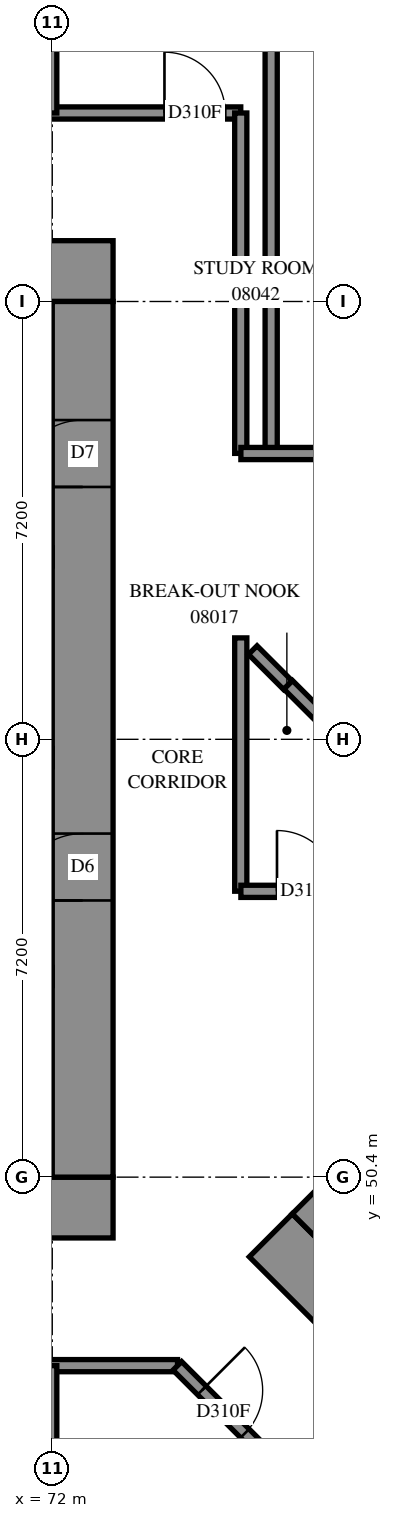
"""IFC4 building model, lengths in metres.
Left out: names, types, materials, properties, quantities, classifications, styles, units other than length and angle.
Written with IfcOpenShell. Run it as: python <this file> out.ifc"""

import sys

from ifc_helpers import new_model, si_unit, direction, frame, frame_2d, origin, place, context, subcontext, project, spatial, rectangle, extrude, element, fill, save


model = new_model("IFC4")
c1 = context("Model", 3, precision=1e-05, world=origin(), true_north=direction((0.0, 1.0)))
c2 = subcontext(c1, "Body", "Model", "MODEL_VIEW")
j1 = project(units=[si_unit("LENGTHUNIT", "METRE"), si_unit("PLANEANGLEUNIT", "RADIAN")], contexts=[c1])
p1 = place(None, origin())
s1 = spatial("IfcSite", under=j1, at=p1, CompositionType="ELEMENT")
p2 = place(p1, origin())
s2 = spatial("IfcBuilding", under=s1, at=p2, CompositionType="ELEMENT")
p3 = place(p2, frame((0.0, 0.0, 33.8)))
s3 = spatial("IfcBuildingStorey", under=s2, at=p3, CompositionType="ELEMENT", Elevation=33.8)
p4 = place(p3, frame((56.6, 49.9, -0.3), z_axis=(0.0, 0.0, 1.0), x_axis=(1.0, 0.0, 0.0)))
e1 = element("IfcWall", 1, at=p4, inside=s3, PredefinedType="SHEAR", context=c2, shape_type="SweptSolid", body=[
    extrude(rectangle(XDim=16.4, YDim=1.0, at=frame_2d((8.2, 0.0))), origin(), (0.0, 0.0, 1.0), 2.7),
])
p5 = place(p3, frame((56.6, 65.3, -0.3), z_axis=(0.0, 0.0, 1.0), x_axis=(1.0, 0.0, 0.0)))
e2 = element("IfcWall", 2, at=p5, inside=s3, PredefinedType="SHEAR", context=c2, shape_type="SweptSolid", body=[
    extrude(rectangle(XDim=16.4, YDim=1.0, at=frame_2d((8.2, 0.0))), origin(), (0.0, 0.0, 1.0), 2.7),
])
p6 = place(p5, frame((11.0, 0.0, 0.3)))
e3 = element("IfcOpeningElement", 3, at=p6, cuts=e2, PredefinedType="OPENING", context=c2, shape_type="SweptSolid", body=[
    extrude(rectangle(XDim=0.8, YDim=2.1, at=frame_2d((0.4, 1.05))), frame((0.0, 0.51, 0.0), z_axis=(0.0, -1.0, 0.0), x_axis=(1.0, 0.0, 0.0)), (0.0, 0.0, 1.0), 1.02),
])
p7 = place(p3, frame((72.5, 50.4, -0.3), z_axis=(0.0, 0.0, 1.0), x_axis=(0.0, 1.0, 0.0)))
e4 = element("IfcWall", 4, at=p7, inside=s3, PredefinedType="SHEAR", context=c2, shape_type="SweptSolid", body=[
    extrude(rectangle(XDim=14.4, YDim=1.0, at=frame_2d((7.2, 0.0))), origin(), (0.0, 0.0, 1.0), 2.7),
])
p8 = place(p7, frame((4.55, 0.0, 0.3)))
e5 = element("IfcOpeningElement", 5, at=p8, cuts=e4, PredefinedType="OPENING", context=c2, shape_type="SweptSolid", body=[
    extrude(rectangle(XDim=1.1, YDim=2.1, at=frame_2d((0.55, 1.05))), frame((0.0, 0.51, 0.0), z_axis=(0.0, -1.0, 0.0), x_axis=(1.0, 0.0, 0.0)), (0.0, 0.0, 1.0), 1.02),
])
p9 = place(p7, frame((11.35, 0.0, 0.3)))
e6 = element("IfcOpeningElement", 6, at=p9, cuts=e4, PredefinedType="OPENING", context=c2, shape_type="SweptSolid", body=[
    extrude(rectangle(XDim=1.1, YDim=2.1, at=frame_2d((0.55, 1.05))), frame((0.0, 0.51, 0.0), z_axis=(0.0, -1.0, 0.0), x_axis=(1.0, 0.0, 0.0)), (0.0, 0.0, 1.0), 1.02),
])
p10 = place(p3, frame((75.594, 49.443, -0.3), z_axis=(0.0, 0.0, 1.0), x_axis=(0.7071037324, -0.70710983, 0.0)))
e7 = element("IfcWall", 7, at=p10, inside=s3, PredefinedType="SHEAR", context=c2, shape_type="SweptSolid", body=[
    extrude(rectangle(XDim=16.4, YDim=1.0, at=frame_2d((8.2, 0.0))), origin(), (0.0, 0.0, 1.0), 2.7),
])
p11 = place(p3, frame((76.301, 49.443, -0.3), z_axis=(0.0, 0.0, 1.0), x_axis=(0.7071067812, 0.7071067812, 0.0)))
e8 = element("IfcWall", 8, at=p11, inside=s3, PredefinedType="SHEAR", context=c2, shape_type="SweptSolid", body=[
    extrude(rectangle(XDim=14.4, YDim=1.0, at=frame_2d((7.2, 0.0))), origin(), (0.0, 0.0, 1.0), 2.7),
])
p12 = place(p11, frame((4.55, 0.0, 0.3)))
e9 = element("IfcOpeningElement", 9, at=p12, cuts=e8, PredefinedType="OPENING", context=c2, shape_type="SweptSolid", body=[
    extrude(rectangle(XDim=1.1, YDim=2.1, at=frame_2d((0.55, 1.05))), frame((0.0, 0.51, 0.0), z_axis=(0.0, -1.0, 0.0), x_axis=(1.0, 0.0, 0.0)), (0.0, 0.0, 1.0), 1.02),
])
p13 = place(p11, frame((11.35, 0.0, 0.3)))
e10 = element("IfcOpeningElement", 10, at=p13, cuts=e8, PredefinedType="OPENING", context=c2, shape_type="SweptSolid", body=[
    extrude(rectangle(XDim=1.1, YDim=2.1, at=frame_2d((0.55, 1.05))), frame((0.0, 0.51, 0.0), z_axis=(0.0, -1.0, 0.0), x_axis=(1.0, 0.0, 0.0)), (0.0, 0.0, 1.0), 1.02),
])
p14 = place(p3, frame((54.5, 67.9, 0.0), z_axis=(0.0, 0.0, 1.0), x_axis=(1.0, 0.0, 0.0)))
e11 = element("IfcWall", 11, at=p14, inside=s3, PredefinedType="PARTITIONING", context=c2, shape_type="SweptSolid", body=[
    extrude(rectangle(XDim=20.6, YDim=0.2, at=frame_2d((10.3, 0.0))), origin(), (0.0, 0.0, 1.0), 3.1),
])
p15 = place(p14, frame((0.255, 0.0, 0.0)))
e12 = element("IfcOpeningElement", 12, at=p15, cuts=e11, PredefinedType="OPENING", context=c2, shape_type="SweptSolid", body=[
    extrude(rectangle(XDim=1.0, YDim=2.1, at=frame_2d((0.5, 1.05))), frame((0.0, 0.11, 0.0), z_axis=(0.0, -1.0, 0.0), x_axis=(1.0, 0.0, 0.0)), (0.0, 0.0, 1.0), 0.22),
])
p16 = place(p14, frame((19.345, 0.0, 0.0)))
e13 = element("IfcOpeningElement", 13, at=p16, cuts=e11, PredefinedType="OPENING", context=c2, shape_type="SweptSolid", body=[
    extrude(rectangle(XDim=1.0, YDim=2.1, at=frame_2d((0.5, 1.05))), frame((0.0, 0.11, 0.0), z_axis=(0.0, -1.0, 0.0), x_axis=(1.0, 0.0, 0.0)), (0.0, 0.0, 1.0), 0.22),
])
p17 = place(p14, frame((5.45, 0.0, 0.0)))
e14 = element("IfcOpeningElement", 14, at=p17, cuts=e11, PredefinedType="OPENING", context=c2, shape_type="SweptSolid", body=[
    extrude(rectangle(XDim=0.9, YDim=2.1, at=frame_2d((0.45, 1.05))), frame((0.0, 0.11, 0.0), z_axis=(0.0, -1.0, 0.0), x_axis=(1.0, 0.0, 0.0)), (0.0, 0.0, 1.0), 0.22),
])
p18 = place(p14, frame((7.1, 0.0, 0.0)))
e15 = element("IfcOpeningElement", 15, at=p18, cuts=e11, PredefinedType="OPENING", context=c2, shape_type="SweptSolid", body=[
    extrude(rectangle(XDim=0.9, YDim=2.1, at=frame_2d((0.45, 1.05))), frame((0.0, 0.11, 0.0), z_axis=(0.0, -1.0, 0.0), x_axis=(1.0, 0.0, 0.0)), (0.0, 0.0, 1.0), 0.22),
])
p19 = place(p14, frame((12.65, 0.0, 0.0)))
e16 = element("IfcOpeningElement", 16, at=p19, cuts=e11, PredefinedType="OPENING", context=c2, shape_type="SweptSolid", body=[
    extrude(rectangle(XDim=0.9, YDim=2.1, at=frame_2d((0.45, 1.05))), frame((0.0, 0.11, 0.0), z_axis=(0.0, -1.0, 0.0), x_axis=(1.0, 0.0, 0.0)), (0.0, 0.0, 1.0), 0.22),
])
p20 = place(p14, frame((14.3, 0.0, 0.0)))
e17 = element("IfcOpeningElement", 17, at=p20, cuts=e11, PredefinedType="OPENING", context=c2, shape_type="SweptSolid", body=[
    extrude(rectangle(XDim=0.9, YDim=2.1, at=frame_2d((0.45, 1.05))), frame((0.0, 0.11, 0.0), z_axis=(0.0, -1.0, 0.0), x_axis=(1.0, 0.0, 0.0)), (0.0, 0.0, 1.0), 0.22),
])
p21 = place(p3, frame((54.5, 47.3, 0.0), z_axis=(0.0, 0.0, 1.0), x_axis=(1.0, 0.0, 0.0)))
e18 = element("IfcWall", 18, at=p21, inside=s3, PredefinedType="PARTITIONING", context=c2, shape_type="SweptSolid", body=[
    extrude(rectangle(XDim=19.56, YDim=0.2, at=frame_2d((9.78, 0.0))), origin(), (0.0, 0.0, 1.0), 3.1),
])
p22 = place(p21, frame((0.243, 0.0, 0.0)))
e19 = element("IfcOpeningElement", 19, at=p22, cuts=e18, PredefinedType="OPENING", context=c2, shape_type="SweptSolid", body=[
    extrude(rectangle(XDim=1.0, YDim=2.1, at=frame_2d((0.5, 1.05))), frame((0.0, 0.11, 0.0), z_axis=(0.0, -1.0, 0.0), x_axis=(1.0, 0.0, 0.0)), (0.0, 0.0, 1.0), 0.22),
])
p23 = place(p21, frame((5.4, 0.0, 0.0)))
e20 = element("IfcOpeningElement", 20, at=p23, cuts=e18, PredefinedType="OPENING", context=c2, shape_type="SweptSolid", body=[
    extrude(rectangle(XDim=0.9, YDim=2.1, at=frame_2d((0.45, 1.05))), frame((0.0, 0.11, 0.0), z_axis=(0.0, -1.0, 0.0), x_axis=(1.0, 0.0, 0.0)), (0.0, 0.0, 1.0), 0.22),
])
p24 = place(p21, frame((7.1, 0.0, 0.0)))
e21 = element("IfcOpeningElement", 21, at=p24, cuts=e18, PredefinedType="OPENING", context=c2, shape_type="SweptSolid", body=[
    extrude(rectangle(XDim=0.9, YDim=2.1, at=frame_2d((0.45, 1.05))), frame((0.0, 0.11, 0.0), z_axis=(0.0, -1.0, 0.0), x_axis=(1.0, 0.0, 0.0)), (0.0, 0.0, 1.0), 0.22),
])
p25 = place(p21, frame((12.6, 0.0, 0.0)))
e22 = element("IfcOpeningElement", 22, at=p25, cuts=e18, PredefinedType="OPENING", context=c2, shape_type="SweptSolid", body=[
    extrude(rectangle(XDim=0.9, YDim=2.1, at=frame_2d((0.45, 1.05))), frame((0.0, 0.11, 0.0), z_axis=(0.0, -1.0, 0.0), x_axis=(1.0, 0.0, 0.0)), (0.0, 0.0, 1.0), 0.22),
])
p26 = place(p21, frame((14.3, 0.0, 0.0)))
e23 = element("IfcOpeningElement", 23, at=p26, cuts=e18, PredefinedType="OPENING", context=c2, shape_type="SweptSolid", body=[
    extrude(rectangle(XDim=0.9, YDim=2.1, at=frame_2d((0.45, 1.05))), frame((0.0, 0.11, 0.0), z_axis=(0.0, -1.0, 0.0), x_axis=(1.0, 0.0, 0.0)), (0.0, 0.0, 1.0), 0.22),
])
p27 = place(p3, frame((75.6, 62.3, 0.0), z_axis=(0.0, 0.0, 1.0), x_axis=(0.0, 1.0, 0.0)))
e24 = element("IfcWall", 24, at=p27, inside=s3, PredefinedType="PARTITIONING", context=c2, shape_type="SweptSolid", body=[
    extrude(rectangle(XDim=10.415, YDim=0.2, at=frame_2d((5.207, 0.0))), origin(), (0.0, 0.0, 1.0), 3.1),
])
p28 = place(p3, frame((75.1, 62.302, 0.0), z_axis=(0.0, 0.0, 1.0), x_axis=(0.0, 1.0, 0.0)))
e25 = element("IfcWall", 25, at=p28, inside=s3, PredefinedType="PARTITIONING", context=c2, shape_type="SweptSolid", body=[
    extrude(rectangle(XDim=5.598, YDim=0.2, at=frame_2d((2.799, 0.0))), origin(), (0.0, 0.0, 1.0), 3.1),
])
p29 = place(p3, frame((74.057, 47.297, 0.0), z_axis=(0.0, 0.0, 1.0), x_axis=(0.7071067812, -0.7071067812, 0.0)))
e26 = element("IfcWall", 26, at=p29, inside=s3, PredefinedType="PARTITIONING", context=c2, shape_type="SweptSolid", body=[
    extrude(rectangle(XDim=4.653, YDim=0.2, at=frame_2d((2.326, 0.0))), origin(), (0.0, 0.0, 1.0), 3.1),
])
p30 = place(p29, frame((0.57, 0.0, 0.0)))
e27 = element("IfcOpeningElement", 27, at=p30, cuts=e26, PredefinedType="OPENING", context=c2, shape_type="SweptSolid", body=[
    extrude(rectangle(XDim=1.0, YDim=2.1, at=frame_2d((0.5, 1.05))), frame((0.0, 0.11, 0.0), z_axis=(0.0, -1.0, 0.0), x_axis=(1.0, 0.0, 0.0)), (0.0, 0.0, 1.0), 0.22),
])
p31 = place(p3, frame((75.1, 55.102, 0.0), z_axis=(0.0, 0.0, 1.0), x_axis=(0.0, 1.0, 0.0)))
e28 = element("IfcWall", 28, at=p31, inside=s3, PredefinedType="PARTITIONING", context=c2, shape_type="SweptSolid", body=[
    extrude(rectangle(XDim=4.166, YDim=0.2, at=frame_2d((2.083, 0.0))), origin(), (0.0, 0.0, 1.0), 3.1),
])
p32 = place(p3, frame((75.102, 62.3, 0.0), z_axis=(0.0, 0.0, 1.0), x_axis=(1.0, 0.0, 0.0)))
e29 = element("IfcWall", 29, at=p32, inside=s3, PredefinedType="PARTITIONING", context=c2, shape_type="SweptSolid", body=[
    extrude(rectangle(XDim=4.098, YDim=0.2, at=frame_2d((2.049, 0.0))), origin(), (0.0, 0.0, 1.0), 3.1),
])
p33 = place(p3, frame((75.102, 55.1, 0.0), z_axis=(0.0, 0.0, 1.0), x_axis=(1.0, 0.0, 0.0)))
e30 = element("IfcWall", 30, at=p33, inside=s3, PredefinedType="PARTITIONING", context=c2, shape_type="SweptSolid", body=[
    extrude(rectangle(XDim=3.178, YDim=0.2, at=frame_2d((1.589, 0.0))), origin(), (0.0, 0.0, 1.0), 3.1),
])
p34 = place(p33, frame((0.594, 0.0, 0.0)))
e31 = element("IfcOpeningElement", 31, at=p34, cuts=e30, PredefinedType="OPENING", context=c2, shape_type="SweptSolid", body=[
    extrude(rectangle(XDim=1.0, YDim=2.1, at=frame_2d((0.5, 1.05))), frame((0.0, 0.11, 0.0), z_axis=(0.0, -1.0, 0.0), x_axis=(1.0, 0.0, 0.0)), (0.0, 0.0, 1.0), 0.22),
])
for number, where, z_axis, x_axis in (
    (32, (72.0, 44.9, 0.0), (0.0, 0.0, 1.0), (0.0, 1.0, 0.0)),
    (33, (72.0, 67.9, 0.0), (0.0, 0.0, 1.0), (0.0, 1.0, 0.0)),
):
    element("IfcWall", number, at=place(p3, frame(where, z_axis=z_axis, x_axis=x_axis)), inside=s3, PredefinedType="PARTITIONING", context=c2, shape_type="SweptSolid", body=[
        extrude(rectangle(XDim=2.4, YDim=0.15, at=frame_2d((1.2, 0.0))), origin(), (0.0, 0.0, 1.0), 3.1),
    ])
p35 = place(p3, frame((75.879, 58.497, 0.0), z_axis=(0.0, 0.0, 1.0), x_axis=(0.7075866635, -0.706626573, 0.0)))
e34 = element("IfcWall", 34, at=p35, inside=s3, PredefinedType="PARTITIONING", context=c2, shape_type="SweptSolid", body=[
    extrude(rectangle(XDim=2.083, YDim=0.2, at=frame_2d((1.042, 0.0))), origin(), (0.0, 0.0, 1.0), 3.1),
])
p36 = place(p3, frame((75.297, 59.067, 0.0), z_axis=(0.0, 0.0, 1.0), x_axis=(0.7071067812, -0.7071067812, 0.0)))
e35 = element("IfcWall", 35, at=p36, inside=s3, PredefinedType="PARTITIONING", context=c2, shape_type="SweptSolid", body=[
    extrude(rectangle(XDim=0.815, YDim=0.2, at=frame_2d((0.407, 0.0))), origin(), (0.0, 0.0, 1.0), 3.1),
])
p37 = place(p8, origin())
e36 = element("IfcDoor", 36, at=p37, inside=s3, OperationType="DOUBLE_DOOR_SINGLE_SWING", PredefinedType="DOOR", context=c2, shape_type="SweptSolid", body=[
    extrude(rectangle(XDim=1.1, YDim=2.1, at=frame_2d((0.55, 1.05))), frame((0.0, 0.025, 0.0), z_axis=(0.0, -1.0, 0.0), x_axis=(1.0, 0.0, 0.0)), (0.0, 0.0, 1.0), 0.05),
])
fill(e5, e36)
p38 = place(p9, origin())
e37 = element("IfcDoor", 37, at=p38, inside=s3, OperationType="SINGLE_SWING_RIGHT", PredefinedType="DOOR", context=c2, shape_type="SweptSolid", body=[
    extrude(rectangle(XDim=1.1, YDim=2.1, at=frame_2d((0.55, 1.05))), frame((0.0, 0.025, 0.0), z_axis=(0.0, -1.0, 0.0), x_axis=(1.0, 0.0, 0.0)), (0.0, 0.0, 1.0), 0.05),
])
fill(e6, e37)
p39 = place(p34, origin())
e38 = element("IfcDoor", 38, at=p39, inside=s3, OperationType="SINGLE_SWING_LEFT", PredefinedType="DOOR", context=c2, shape_type="SweptSolid", body=[
    extrude(rectangle(XDim=1.0, YDim=2.1, at=frame_2d((0.5, 1.05))), frame((0.0, 0.025, 0.0), z_axis=(0.0, -1.0, 0.0), x_axis=(1.0, 0.0, 0.0)), (0.0, 0.0, 1.0), 0.05),
])
fill(e31, e38)
p40 = place(p16, origin())
e39 = element("IfcDoor", 39, at=p40, inside=s3, OperationType="SINGLE_SWING_RIGHT", PredefinedType="DOOR", context=c2, shape_type="SweptSolid", body=[
    extrude(rectangle(XDim=1.0, YDim=2.1, at=frame_2d((0.5, 1.05))), frame((0.0, 0.025, 0.0), z_axis=(0.0, -1.0, 0.0), x_axis=(1.0, 0.0, 0.0)), (0.0, 0.0, 1.0), 0.05),
])
fill(e13, e39)
p41 = place(p30, origin())
e40 = element("IfcDoor", 40, at=p41, inside=s3, OperationType="SINGLE_SWING_LEFT", PredefinedType="DOOR", context=c2, shape_type="SweptSolid", body=[
    extrude(rectangle(XDim=1.0, YDim=2.1, at=frame_2d((0.5, 1.05))), frame((0.0, 0.025, 0.0), z_axis=(0.0, -1.0, 0.0), x_axis=(1.0, 0.0, 0.0)), (0.0, 0.0, 1.0), 0.05),
])
fill(e27, e40)
save(model, sys.argv[1])
